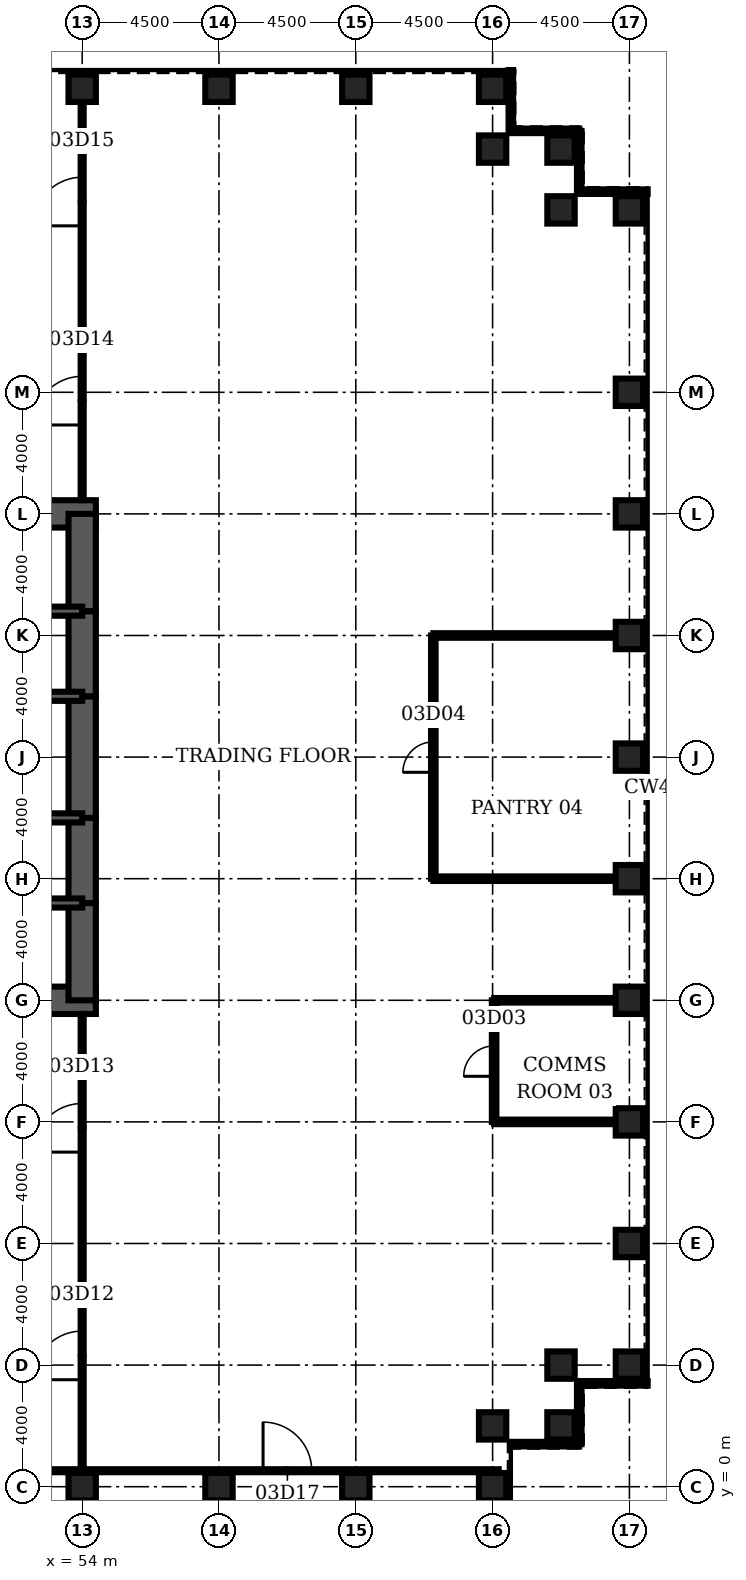
"""IFC4 building model, lengths in metres.
Left out: names, types, materials, properties, quantities, classifications, styles, units other than length and angle.
Written with IfcOpenShell. Run it as: python <this file> out.ifc"""

import sys

from ifc_helpers import new_model, si_unit, direction, frame, frame_2d, origin, origin_2d, place, context, subcontext, project, spatial, rectangle, hollow_rectangle, extrude, element, fill, save


model = new_model("IFC4")
c1 = context("Model", 3, precision=1e-05, world=origin(), true_north=direction((0.0, 1.0)))
c2 = subcontext(c1, "Body", "Model", "MODEL_VIEW")
j1 = project(units=[si_unit("LENGTHUNIT", "METRE"), si_unit("PLANEANGLEUNIT", "RADIAN")], contexts=[c1])
p1 = place(None, origin())
s1 = spatial("IfcSite", under=j1, at=p1, CompositionType="ELEMENT")
p2 = place(p1, origin())
s2 = spatial("IfcBuilding", under=s1, at=p2, CompositionType="ELEMENT")
p3 = place(p2, frame((0.0, 0.0, 18.0)))
s3 = spatial("IfcBuildingStorey", under=s2, at=p3, CompositionType="ELEMENT", Elevation=18.0)
for number, where, z_axis, x_axis in (
    (1, (54.0, 0.0, 0.0), (0.0, 0.0, 1.0), (0.0, 1.0, 0.0)),
    (2, (58.5, 0.0, 0.0), (0.0, 0.0, 1.0), (0.0, 1.0, 0.0)),
    (3, (63.0, 0.0, 0.0), (0.0, 0.0, 1.0), (0.0, 1.0, 0.0)),
    (4, (67.5, 0.0, 0.0), (0.0, 0.0, 1.0), (0.0, 1.0, 0.0)),
    (5, (67.5, 2.0, 0.0), (0.0, 0.0, 1.0), (0.0, 1.0, 0.0)),
    (6, (69.75, 2.0, 0.0), (0.0, 0.0, 1.0), (1.0, 0.0, 0.0)),
    (7, (69.75, 4.0, 0.0), (0.0, 0.0, 1.0), (1.0, 0.0, 0.0)),
    (8, (72.0, 4.0, 0.0), (0.0, 0.0, 1.0), (1.0, 0.0, 0.0)),
    (9, (72.0, 8.0, 0.0), (0.0, 0.0, 1.0), (1.0, 0.0, 0.0)),
    (10, (72.0, 12.0, 0.0), (0.0, 0.0, 1.0), (1.0, 0.0, 0.0)),
    (11, (72.0, 16.0, 0.0), (0.0, 0.0, 1.0), (1.0, 0.0, 0.0)),
    (12, (72.0, 20.0, 0.0), (0.0, 0.0, 1.0), (1.0, 0.0, 0.0)),
    (13, (72.0, 24.0, 0.0), (0.0, 0.0, 1.0), (1.0, 0.0, 0.0)),
    (14, (72.0, 28.0, 0.0), (0.0, 0.0, 1.0), (1.0, 0.0, 0.0)),
    (15, (72.0, 32.0, 0.0), (0.0, 0.0, 1.0), (1.0, 0.0, 0.0)),
    (16, (72.0, 36.0, 0.0), (0.0, 0.0, 1.0), (1.0, 0.0, 0.0)),
    (17, (72.0, 42.0, 0.0), (0.0, 0.0, 1.0), (1.0, 0.0, 0.0)),
    (18, (69.75, 42.0, 0.0), (0.0, 0.0, 1.0), (1.0, 0.0, 0.0)),
    (19, (69.75, 44.0, 0.0), (0.0, 0.0, 1.0), (1.0, 0.0, 0.0)),
    (20, (67.5, 44.0, 0.0), (0.0, 0.0, 1.0), (0.0, 1.0, 0.0)),
    (21, (67.5, 46.0, 0.0), (0.0, 0.0, 1.0), (0.0, 1.0, 0.0)),
    (22, (63.0, 46.0, 0.0), (0.0, 0.0, 1.0), (0.0, 1.0, 0.0)),
    (23, (58.5, 46.0, 0.0), (0.0, 0.0, 1.0), (0.0, 1.0, 0.0)),
    (24, (54.0, 46.0, 0.0), (0.0, 0.0, 1.0), (0.0, 1.0, 0.0)),
):
    element("IfcColumn", number, at=place(p3, frame(where, z_axis=z_axis, x_axis=x_axis)), inside=s3, PredefinedType="COLUMN", context=c2, shape_type="SweptSolid", body=[
        extrude(hollow_rectangle(XDim=0.9, YDim=0.9, WallThickness=0.12, at=origin_2d()), origin(), (0.0, 0.0, 1.0), 5.0),
    ])
for number, where, z_axis, x_axis in (
    (25, (45.0, 16.0, 0.0), (0.0, 0.0, 1.0), (1.0, 0.0, 0.0)),
    (26, (54.45, 32.0, 0.0), (0.0, 0.0, 1.0), (-1.0, 0.0, 0.0)),
):
    element("IfcWall", number, at=place(p3, frame(where, z_axis=z_axis, x_axis=x_axis)), inside=s3, PredefinedType="SHEAR", context=c2, shape_type="SweptSolid", body=[
        extrude(rectangle(XDim=9.45, YDim=0.9, at=frame_2d((4.725, 0.0))), origin(), (0.0, 0.0, 1.0), 5.0),
    ])
p4 = place(p3, frame((54.0, 16.0, 0.0), z_axis=(0.0, 0.0, 1.0), x_axis=(0.0, 1.0, 0.0)))
e27 = element("IfcWall", 27, at=p4, inside=s3, PredefinedType="SHEAR", context=c2, shape_type="SweptSolid", body=[
    extrude(rectangle(XDim=3.2, YDim=0.9, at=frame_2d((1.6, 0.0))), origin(), (0.0, 0.0, 1.0), 5.0),
])
p5 = place(p3, frame((54.0, 19.2, 0.0), z_axis=(0.0, 0.0, 1.0), x_axis=(0.0, 1.0, 0.0)))
e28 = element("IfcWall", 28, at=p5, inside=s3, PredefinedType="SHEAR", context=c2, shape_type="SweptSolid", body=[
    extrude(rectangle(XDim=2.8, YDim=0.9, at=frame_2d((1.4, 0.0))), origin(), (0.0, 0.0, 1.0), 5.0),
])
p6 = place(p5, frame((0.4, 0.0, 0.0)))
e29 = element("IfcOpeningElement", 29, at=p6, cuts=e28, PredefinedType="OPENING", context=c2, shape_type="SweptSolid", body=[
    extrude(rectangle(XDim=1.8, YDim=2.1, at=frame_2d((0.9, 1.05))), frame((0.0, 0.46, 0.0), z_axis=(0.0, -1.0, 0.0), x_axis=(1.0, 0.0, 0.0)), (0.0, 0.0, 1.0), 0.92),
])
p7 = place(p3, frame((54.0, 22.0, 0.0), z_axis=(0.0, 0.0, 1.0), x_axis=(0.0, 1.0, 0.0)))
e30 = element("IfcWall", 30, at=p7, inside=s3, PredefinedType="SHEAR", context=c2, shape_type="SweptSolid", body=[
    extrude(rectangle(XDim=4.0, YDim=0.9, at=frame_2d((2.0, 0.0))), origin(), (0.0, 0.0, 1.0), 5.0),
])
p8 = place(p3, frame((54.0, 26.0, 0.0), z_axis=(0.0, 0.0, 1.0), x_axis=(0.0, 1.0, 0.0)))
e31 = element("IfcWall", 31, at=p8, inside=s3, PredefinedType="SHEAR", context=c2, shape_type="SweptSolid", body=[
    extrude(rectangle(XDim=2.8, YDim=0.9, at=frame_2d((1.4, 0.0))), origin(), (0.0, 0.0, 1.0), 5.0),
])
p9 = place(p8, frame((0.6, 0.0, 0.0)))
e32 = element("IfcOpeningElement", 32, at=p9, cuts=e31, PredefinedType="OPENING", context=c2, shape_type="SweptSolid", body=[
    extrude(rectangle(XDim=1.8, YDim=2.1, at=frame_2d((0.9, 1.05))), frame((0.0, 0.46, 0.0), z_axis=(0.0, -1.0, 0.0), x_axis=(1.0, 0.0, 0.0)), (0.0, 0.0, 1.0), 0.92),
])
p10 = place(p3, frame((54.0, 28.8, 0.0), z_axis=(0.0, 0.0, 1.0), x_axis=(0.0, 1.0, 0.0)))
e33 = element("IfcWall", 33, at=p10, inside=s3, PredefinedType="SHEAR", context=c2, shape_type="SweptSolid", body=[
    extrude(rectangle(XDim=3.2, YDim=0.9, at=frame_2d((1.6, 0.0))), origin(), (0.0, 0.0, 1.0), 5.0),
])
p11 = place(p3, frame((45.0, 19.2, 0.0), z_axis=(0.0, 0.0, 1.0), x_axis=(1.0, 0.0, 0.0)))
e34 = element("IfcWall", 34, at=p11, inside=s3, PredefinedType="SOLIDWALL", context=c2, shape_type="SweptSolid", body=[
    extrude(rectangle(XDim=9.0, YDim=0.3, at=frame_2d((4.5, 0.0))), origin(), (0.0, 0.0, 1.0), 5.0),
])
p12 = place(p11, frame((7.35, 0.0, 0.0)))
e35 = element("IfcOpeningElement", 35, at=p12, cuts=e34, PredefinedType="OPENING", context=c2, shape_type="SweptSolid", body=[
    extrude(rectangle(XDim=1.0, YDim=2.1, at=frame_2d((0.5, 1.05))), frame((0.0, 0.16, 0.0), z_axis=(0.0, -1.0, 0.0), x_axis=(1.0, 0.0, 0.0)), (0.0, 0.0, 1.0), 0.32),
])
p13 = place(p3, frame((45.0, 28.8, 0.0), z_axis=(0.0, 0.0, 1.0), x_axis=(1.0, 0.0, 0.0)))
e36 = element("IfcWall", 36, at=p13, inside=s3, PredefinedType="SOLIDWALL", context=c2, shape_type="SweptSolid", body=[
    extrude(rectangle(XDim=9.0, YDim=0.3, at=frame_2d((4.5, 0.0))), origin(), (0.0, 0.0, 1.0), 5.0),
])
p14 = place(p13, frame((7.35, 0.0, 0.0)))
e37 = element("IfcOpeningElement", 37, at=p14, cuts=e36, PredefinedType="OPENING", context=c2, shape_type="SweptSolid", body=[
    extrude(rectangle(XDim=1.0, YDim=2.1, at=frame_2d((0.5, 1.05))), frame((0.0, 0.16, 0.0), z_axis=(0.0, -1.0, 0.0), x_axis=(1.0, 0.0, 0.0)), (0.0, 0.0, 1.0), 0.32),
])
p15 = place(p3, frame((48.0, 22.0, 0.0), z_axis=(0.0, 0.0, 1.0), x_axis=(1.0, 0.0, 0.0)))
e38 = element("IfcWall", 38, at=p15, inside=s3, PredefinedType="SOLIDWALL", context=c2, shape_type="SweptSolid", body=[
    extrude(rectangle(XDim=6.0, YDim=0.3, at=frame_2d((3.0, 0.0))), origin(), (0.0, 0.0, 1.0), 5.0),
])
p16 = place(p15, frame((2.0, 0.0, 0.0)))
e39 = element("IfcOpeningElement", 39, at=p16, cuts=e38, PredefinedType="OPENING", context=c2, shape_type="SweptSolid", body=[
    extrude(rectangle(XDim=1.0, YDim=2.1, at=frame_2d((0.5, 1.05))), frame((0.0, 0.16, 0.0), z_axis=(0.0, -1.0, 0.0), x_axis=(1.0, 0.0, 0.0)), (0.0, 0.0, 1.0), 0.32),
])
p17 = place(p15, frame((4.0, 0.0, 0.0)))
e40 = element("IfcOpeningElement", 40, at=p17, cuts=e38, PredefinedType="OPENING", context=c2, shape_type="SweptSolid", body=[
    extrude(rectangle(XDim=1.0, YDim=2.1, at=frame_2d((0.5, 1.05))), frame((0.0, 0.16, 0.0), z_axis=(0.0, -1.0, 0.0), x_axis=(1.0, 0.0, 0.0)), (0.0, 0.0, 1.0), 0.32),
])
p18 = place(p3, frame((48.0, 26.0, 0.0), z_axis=(0.0, 0.0, 1.0), x_axis=(1.0, 0.0, 0.0)))
e41 = element("IfcWall", 41, at=p18, inside=s3, PredefinedType="SOLIDWALL", context=c2, shape_type="SweptSolid", body=[
    extrude(rectangle(XDim=6.0, YDim=0.3, at=frame_2d((3.0, 0.0))), origin(), (0.0, 0.0, 1.0), 5.0),
])
for number, where, z_axis, x_axis in (
    (42, (67.55, 12.0, 0.0), (0.0, 0.0, 1.0), (1.0, 0.0, 0.0)),
    (43, (67.55, 16.0, 0.0), (0.0, 0.0, 1.0), (1.0, 0.0, 0.0)),
):
    element("IfcWall", number, at=place(p3, frame(where, z_axis=z_axis, x_axis=x_axis)), inside=s3, PredefinedType="PARTITIONING", context=c2, shape_type="SweptSolid", body=[
        extrude(rectangle(XDim=4.0, YDim=0.15, at=frame_2d((2.0, 0.0))), origin(), (0.0, 0.0, 1.0), 3.0),
    ])
for number, where, z_axis, x_axis in (
    (44, (65.55, 20.0, 0.0), (0.0, 0.0, 1.0), (1.0, 0.0, 0.0)),
    (45, (65.55, 28.0, 0.0), (0.0, 0.0, 1.0), (1.0, 0.0, 0.0)),
):
    element("IfcWall", number, at=place(p3, frame(where, z_axis=z_axis, x_axis=x_axis)), inside=s3, PredefinedType="PARTITIONING", context=c2, shape_type="SweptSolid", body=[
        extrude(rectangle(XDim=6.0, YDim=0.15, at=frame_2d((3.0, 0.0))), origin(), (0.0, 0.0, 1.0), 3.0),
    ])
p19 = place(p3, frame((54.0, 0.575, 0.0), z_axis=(0.0, 0.0, 1.0), x_axis=(0.0, 1.0, 0.0)))
e46 = element("IfcWall", 46, at=p19, inside=s3, PredefinedType="PARTITIONING", context=c2, shape_type="SweptSolid", body=[
    extrude(rectangle(XDim=14.975, YDim=0.1, at=frame_2d((7.488, 0.0))), origin(), (0.0, 0.0, 1.0), 3.0),
])
p20 = place(p19, frame((2.944, 0.0, 0.0)))
e47 = element("IfcOpeningElement", 47, at=p20, cuts=e46, PredefinedType="OPENING", context=c2, shape_type="SweptSolid", body=[
    extrude(rectangle(XDim=1.6, YDim=2.1, at=frame_2d((0.8, 1.05))), frame((0.0, 0.06, 0.0), z_axis=(0.0, -1.0, 0.0), x_axis=(1.0, 0.0, 0.0)), (0.0, 0.0, 1.0), 0.12),
])
p21 = place(p19, frame((10.431, 0.0, 0.0)))
e48 = element("IfcOpeningElement", 48, at=p21, cuts=e46, PredefinedType="OPENING", context=c2, shape_type="SweptSolid", body=[
    extrude(rectangle(XDim=1.6, YDim=2.1, at=frame_2d((0.8, 1.05))), frame((0.0, 0.06, 0.0), z_axis=(0.0, -1.0, 0.0), x_axis=(1.0, 0.0, 0.0)), (0.0, 0.0, 1.0), 0.12),
])
p22 = place(p3, frame((54.0, 32.45, 0.0), z_axis=(0.0, 0.0, 1.0), x_axis=(0.0, 1.0, 0.0)))
e49 = element("IfcWall", 49, at=p22, inside=s3, PredefinedType="PARTITIONING", context=c2, shape_type="SweptSolid", body=[
    extrude(rectangle(XDim=13.1, YDim=0.1, at=frame_2d((6.55, 0.0))), origin(), (0.0, 0.0, 1.0), 3.0),
])
p23 = place(p22, frame((2.475, 0.0, 0.0)))
e50 = element("IfcOpeningElement", 50, at=p23, cuts=e49, PredefinedType="OPENING", context=c2, shape_type="SweptSolid", body=[
    extrude(rectangle(XDim=1.6, YDim=2.1, at=frame_2d((0.8, 1.05))), frame((0.0, 0.06, 0.0), z_axis=(0.0, -1.0, 0.0), x_axis=(1.0, 0.0, 0.0)), (0.0, 0.0, 1.0), 0.12),
])
p24 = place(p22, frame((9.025, 0.0, 0.0)))
e51 = element("IfcOpeningElement", 51, at=p24, cuts=e49, PredefinedType="OPENING", context=c2, shape_type="SweptSolid", body=[
    extrude(rectangle(XDim=1.6, YDim=2.1, at=frame_2d((0.8, 1.05))), frame((0.0, 0.06, 0.0), z_axis=(0.0, -1.0, 0.0), x_axis=(1.0, 0.0, 0.0)), (0.0, 0.0, 1.0), 0.12),
])
p25 = place(p3, frame((65.55, 20.0, 0.0), z_axis=(0.0, 0.0, 1.0), x_axis=(0.0, 1.0, 0.0)))
e52 = element("IfcWall", 52, at=p25, inside=s3, PredefinedType="PARTITIONING", context=c2, shape_type="SweptSolid", body=[
    extrude(rectangle(XDim=8.0, YDim=0.15, at=frame_2d((4.0, 0.0))), origin(), (0.0, 0.0, 1.0), 3.0),
])
p26 = place(p25, frame((3.5, 0.0, 0.0)))
e53 = element("IfcOpeningElement", 53, at=p26, cuts=e52, PredefinedType="OPENING", context=c2, shape_type="SweptSolid", body=[
    extrude(rectangle(XDim=1.0, YDim=2.1, at=frame_2d((0.5, 1.05))), frame((0.0, 0.085, 0.0), z_axis=(0.0, -1.0, 0.0), x_axis=(1.0, 0.0, 0.0)), (0.0, 0.0, 1.0), 0.17),
])
p27 = place(p3, frame((67.55, 12.0, 0.0), z_axis=(0.0, 0.0, 1.0), x_axis=(0.0, 1.0, 0.0)))
e54 = element("IfcWall", 54, at=p27, inside=s3, PredefinedType="PARTITIONING", context=c2, shape_type="SweptSolid", body=[
    extrude(rectangle(XDim=4.0, YDim=0.15, at=frame_2d((2.0, 0.0))), origin(), (0.0, 0.0, 1.0), 3.0),
])
p28 = place(p27, frame((1.5, 0.0, 0.0)))
e55 = element("IfcOpeningElement", 55, at=p28, cuts=e54, PredefinedType="OPENING", context=c2, shape_type="SweptSolid", body=[
    extrude(rectangle(XDim=1.0, YDim=2.1, at=frame_2d((0.5, 1.05))), frame((0.0, 0.085, 0.0), z_axis=(0.0, -1.0, 0.0), x_axis=(1.0, 0.0, 0.0)), (0.0, 0.0, 1.0), 0.17),
])
p29 = place(p3, frame((49.5, 0.525, 0.0), z_axis=(0.0, 0.0, 1.0), x_axis=(1.0, 0.0, 0.0)))
e56 = element("IfcWall", 56, at=p29, inside=s3, PredefinedType="PARTITIONING", context=c2, shape_type="SweptSolid", body=[
    extrude(rectangle(XDim=18.2, YDim=0.1, at=frame_2d((9.1, 0.0))), origin(), (0.0, 0.0, 1.0), 3.0),
])
p30 = place(p29, frame((10.45, 0.0, 0.0)))
e57 = element("IfcOpeningElement", 57, at=p30, cuts=e56, PredefinedType="OPENING", context=c2, shape_type="SweptSolid", body=[
    extrude(rectangle(XDim=1.6, YDim=2.1, at=frame_2d((0.8, 1.05))), frame((0.0, 0.06, 0.0), z_axis=(0.0, -1.0, 0.0), x_axis=(1.0, 0.0, 0.0)), (0.0, 0.0, 1.0), 0.12),
])
p31 = place(p3, frame((68.1, 1.4, 0.0), z_axis=(0.0, 0.0, 1.0), x_axis=(1.0, 0.0, 0.0)))
e58 = element("IfcWall", 58, at=p31, inside=s3, PredefinedType="ELEMENTEDWALL", context=c2, shape_type="SweptSolid", body=[
    extrude(rectangle(XDim=2.25, YDim=0.15, at=frame_2d((1.125, 0.0))), origin(), (0.0, 0.0, 1.0), 4.82),
])
p32 = place(p3, frame((70.35, 1.4, 0.0), z_axis=(0.0, 0.0, 1.0), x_axis=(0.0, 1.0, 0.0)))
e59 = element("IfcWall", 59, at=p32, inside=s3, PredefinedType="ELEMENTEDWALL", context=c2, shape_type="SweptSolid", body=[
    extrude(rectangle(XDim=2.0, YDim=0.15, at=frame_2d((1.0, 0.0))), origin(), (0.0, 0.0, 1.0), 4.82),
])
for number, where, z_axis, x_axis in (
    (60, (70.35, 3.4, 0.0), (0.0, 0.0, 1.0), (1.0, 0.0, 0.0)),
    (61, (72.6, 42.6, 0.0), (0.0, 0.0, 1.0), (-1.0, 0.0, 0.0)),
):
    element("IfcWall", number, at=place(p3, frame(where, z_axis=z_axis, x_axis=x_axis)), inside=s3, PredefinedType="ELEMENTEDWALL", context=c2, shape_type="SweptSolid", body=[
        extrude(rectangle(XDim=2.25, YDim=0.15, at=frame_2d((1.125, 0.0))), origin(), (0.0, 0.0, 1.0), 4.82),
    ])
p33 = place(p3, frame((70.35, 42.6, 0.0), z_axis=(0.0, 0.0, 1.0), x_axis=(0.0, 1.0, 0.0)))
e62 = element("IfcWall", 62, at=p33, inside=s3, PredefinedType="ELEMENTEDWALL", context=c2, shape_type="SweptSolid", body=[
    extrude(rectangle(XDim=2.0, YDim=0.15, at=frame_2d((1.0, 0.0))), origin(), (0.0, 0.0, 1.0), 4.82),
])
p34 = place(p3, frame((70.35, 44.6, 0.0), z_axis=(0.0, 0.0, 1.0), x_axis=(-1.0, 0.0, 0.0)))
e63 = element("IfcWall", 63, at=p34, inside=s3, PredefinedType="ELEMENTEDWALL", context=c2, shape_type="SweptSolid", body=[
    extrude(rectangle(XDim=2.25, YDim=0.15, at=frame_2d((1.125, 0.0))), origin(), (0.0, 0.0, 1.0), 4.82),
])
p35 = place(p3, frame((68.1, 44.6, 0.0), z_axis=(0.0, 0.0, 1.0), x_axis=(0.0, 1.0, 0.0)))
e64 = element("IfcWall", 64, at=p35, inside=s3, PredefinedType="ELEMENTEDWALL", context=c2, shape_type="SweptSolid", body=[
    extrude(rectangle(XDim=2.0, YDim=0.15, at=frame_2d((1.0, 0.0))), origin(), (0.0, 0.0, 1.0), 4.82),
])
p36 = place(p28, origin())
e65 = element("IfcDoor", 65, at=p36, inside=s3, OperationType="SINGLE_SWING_LEFT", PredefinedType="DOOR", context=c2, shape_type="SweptSolid", body=[
    extrude(rectangle(XDim=1.0, YDim=2.1, at=frame_2d((0.5, 1.05))), frame((0.0, 0.025, 0.0), z_axis=(0.0, -1.0, 0.0), x_axis=(1.0, 0.0, 0.0)), (0.0, 0.0, 1.0), 0.05),
])
fill(e55, e65)
p37 = place(p26, origin())
e66 = element("IfcDoor", 66, at=p37, inside=s3, OperationType="SINGLE_SWING_LEFT", PredefinedType="DOOR", context=c2, shape_type="SweptSolid", body=[
    extrude(rectangle(XDim=1.0, YDim=2.1, at=frame_2d((0.5, 1.05))), frame((0.0, 0.025, 0.0), z_axis=(0.0, -1.0, 0.0), x_axis=(1.0, 0.0, 0.0)), (0.0, 0.0, 1.0), 0.05),
])
fill(e53, e66)
p38 = place(p20, origin())
e67 = element("IfcDoor", 67, at=p38, inside=s3, OperationType="SINGLE_SWING_LEFT", PredefinedType="DOOR", context=c2, shape_type="SweptSolid", body=[
    extrude(rectangle(XDim=1.6, YDim=2.1, at=frame_2d((0.8, 1.05))), frame((0.0, 0.025, 0.0), z_axis=(0.0, -1.0, 0.0), x_axis=(1.0, 0.0, 0.0)), (0.0, 0.0, 1.0), 0.05),
])
fill(e47, e67)
p39 = place(p21, origin())
e68 = element("IfcDoor", 68, at=p39, inside=s3, OperationType="SINGLE_SWING_LEFT", PredefinedType="DOOR", context=c2, shape_type="SweptSolid", body=[
    extrude(rectangle(XDim=1.6, YDim=2.1, at=frame_2d((0.8, 1.05))), frame((0.0, 0.025, 0.0), z_axis=(0.0, -1.0, 0.0), x_axis=(1.0, 0.0, 0.0)), (0.0, 0.0, 1.0), 0.05),
])
fill(e48, e68)
p40 = place(p23, origin())
e69 = element("IfcDoor", 69, at=p40, inside=s3, OperationType="SINGLE_SWING_LEFT", PredefinedType="DOOR", context=c2, shape_type="SweptSolid", body=[
    extrude(rectangle(XDim=1.6, YDim=2.1, at=frame_2d((0.8, 1.05))), frame((0.0, 0.025, 0.0), z_axis=(0.0, -1.0, 0.0), x_axis=(1.0, 0.0, 0.0)), (0.0, 0.0, 1.0), 0.05),
])
fill(e50, e69)
p41 = place(p24, origin())
e70 = element("IfcDoor", 70, at=p41, inside=s3, OperationType="SINGLE_SWING_LEFT", PredefinedType="DOOR", context=c2, shape_type="SweptSolid", body=[
    extrude(rectangle(XDim=1.6, YDim=2.1, at=frame_2d((0.8, 1.05))), frame((0.0, 0.025, 0.0), z_axis=(0.0, -1.0, 0.0), x_axis=(1.0, 0.0, 0.0)), (0.0, 0.0, 1.0), 0.05),
])
fill(e51, e70)
p42 = place(p30, origin())
e71 = element("IfcDoor", 71, at=p42, inside=s3, OperationType="SINGLE_SWING_LEFT", PredefinedType="DOOR", context=c2, shape_type="SweptSolid", body=[
    extrude(rectangle(XDim=1.6, YDim=2.1, at=frame_2d((0.8, 1.05))), frame((0.0, 0.025, 0.0), z_axis=(0.0, -1.0, 0.0), x_axis=(1.0, 0.0, 0.0)), (0.0, 0.0, 1.0), 0.05),
])
fill(e57, e71)
p43 = place(p12, origin())
e72 = element("IfcDoor", 72, at=p43, inside=s3, OperationType="SINGLE_SWING_RIGHT", PredefinedType="DOOR", context=c2, shape_type="SweptSolid", body=[
    extrude(rectangle(XDim=1.0, YDim=2.1, at=frame_2d((0.5, 1.05))), frame((0.0, 0.025, 0.0), z_axis=(0.0, -1.0, 0.0), x_axis=(1.0, 0.0, 0.0)), (0.0, 0.0, 1.0), 0.05),
])
fill(e35, e72)
p44 = place(p14, origin())
e73 = element("IfcDoor", 73, at=p44, inside=s3, OperationType="SINGLE_SWING_RIGHT", PredefinedType="DOOR", context=c2, shape_type="SweptSolid", body=[
    extrude(rectangle(XDim=1.0, YDim=2.1, at=frame_2d((0.5, 1.05))), frame((0.0, 0.025, 0.0), z_axis=(0.0, -1.0, 0.0), x_axis=(1.0, 0.0, 0.0)), (0.0, 0.0, 1.0), 0.05),
])
fill(e37, e73)
p45 = place(p6, origin())
e74 = element("IfcDoor", 74, at=p45, inside=s3, OperationType="SINGLE_SWING_LEFT", PredefinedType="DOOR", context=c2, shape_type="SweptSolid", body=[
    extrude(rectangle(XDim=1.8, YDim=2.1, at=frame_2d((0.9, 1.05))), frame((0.0, 0.45, 0.0), z_axis=(0.0, -1.0, 0.0), x_axis=(1.0, 0.0, 0.0)), (0.0, 0.0, 1.0), 0.899),
])
fill(e29, e74)
p46 = place(p9, origin())
e75 = element("IfcDoor", 75, at=p46, inside=s3, OperationType="SINGLE_SWING_LEFT", PredefinedType="DOOR", context=c2, shape_type="SweptSolid", body=[
    extrude(rectangle(XDim=1.8, YDim=2.1, at=frame_2d((0.9, 1.05))), frame((0.0, 0.45, 0.0), z_axis=(0.0, -1.0, 0.0), x_axis=(1.0, 0.0, 0.0)), (0.0, 0.0, 1.0), 0.899),
])
fill(e32, e75)
save(model, sys.argv[1])
